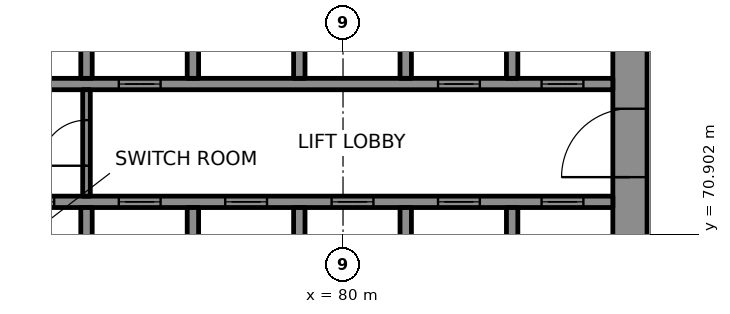
"""IFC4 building model, lengths in metres.
Left out: names, types, materials, properties, quantities, classifications, styles, units other than length and angle.
Written with IfcOpenShell. Run it as: python <this file> out.ifc"""

import sys

from ifc_helpers import new_model, si_unit, direction, frame, frame_2d, origin, place, context, subcontext, project, spatial, rectangle, extrude, element, fill, save


model = new_model("IFC4")
c1 = context("Model", 3, precision=1e-05, world=origin(), true_north=direction((0.0, 1.0)))
c2 = subcontext(c1, "Body", "Model", "MODEL_VIEW")
j1 = project(units=[si_unit("LENGTHUNIT", "METRE"), si_unit("PLANEANGLEUNIT", "RADIAN")], contexts=[c1])
p1 = place(None, origin())
s1 = spatial("IfcSite", under=j1, at=p1, CompositionType="ELEMENT")
p2 = place(p1, origin())
s2 = spatial("IfcBuilding", under=s1, at=p2, CompositionType="ELEMENT")
p3 = place(p2, frame((0.0, 0.0, 35.5)))
s3 = spatial("IfcBuildingStorey", under=s2, at=p3, CompositionType="ELEMENT", Elevation=35.5)
p4 = place(p3, frame((87.55, 66.9, 0.0), z_axis=(0.0, 0.0, 1.0), x_axis=(0.0, 1.0, 0.0)))
e1 = element("IfcWall", 1, at=p4, inside=s3, PredefinedType="SHEAR", context=c2, shape_type="SweptSolid", body=[
    extrude(rectangle(XDim=16.2, YDim=0.9, at=frame_2d((8.1, 0.0))), origin(), (0.0, 0.0, 1.0), 4.3),
])
p5 = place(p4, frame((5.5, 0.0, 0.0)))
e2 = element("IfcOpeningElement", 2, at=p5, cuts=e1, PredefinedType="OPENING", context=c2, shape_type="SweptSolid", body=[
    extrude(rectangle(XDim=1.8, YDim=2.1, at=frame_2d((0.9, 1.05))), frame((0.0, 0.46, 0.0), z_axis=(0.0, -1.0, 0.0), x_axis=(1.0, 0.0, 0.0)), (0.0, 0.0, 1.0), 0.92),
])
p6 = place(p4, frame((11.202, 0.0, 0.0)))
e3 = element("IfcOpeningElement", 3, at=p6, cuts=e1, PredefinedType="OPENING", context=c2, shape_type="SweptSolid", body=[
    extrude(rectangle(XDim=0.9, YDim=2.1, at=frame_2d((0.45, 1.05))), frame((0.0, 0.46, 0.0), z_axis=(0.0, -1.0, 0.0), x_axis=(1.0, 0.0, 0.0)), (0.0, 0.0, 1.0), 0.92),
])
p7 = place(p3, frame((70.3, 71.75, 0.0), z_axis=(0.0, 0.0, 1.0), x_axis=(1.0, 0.0, 0.0)))
e4 = element("IfcWall", 4, at=p7, inside=s3, PredefinedType="SHEAR", context=c2, shape_type="SweptSolid", body=[
    extrude(rectangle(XDim=16.8, YDim=0.3, at=frame_2d((8.4, 0.0))), origin(), (0.0, 0.0, 1.0), 4.3),
])
p8 = place(p7, frame((1.0, 0.0, 0.0)))
e5 = element("IfcOpeningElement", 5, at=p8, cuts=e4, PredefinedType="OPENING", context=c2, shape_type="SweptSolid", body=[
    extrude(rectangle(XDim=1.1, YDim=2.1, at=frame_2d((0.55, 1.05))), frame((0.0, 0.16, 0.0), z_axis=(0.0, -1.0, 0.0), x_axis=(1.0, 0.0, 0.0)), (0.0, 0.0, 1.0), 0.32),
])
p9 = place(p7, frame((3.8, 0.0, 0.0)))
e6 = element("IfcOpeningElement", 6, at=p9, cuts=e4, PredefinedType="OPENING", context=c2, shape_type="SweptSolid", body=[
    extrude(rectangle(XDim=1.1, YDim=2.1, at=frame_2d((0.55, 1.05))), frame((0.0, 0.16, 0.0), z_axis=(0.0, -1.0, 0.0), x_axis=(1.0, 0.0, 0.0)), (0.0, 0.0, 1.0), 0.32),
])
p10 = place(p7, frame((6.6, 0.0, 0.0)))
e7 = element("IfcOpeningElement", 7, at=p10, cuts=e4, PredefinedType="OPENING", context=c2, shape_type="SweptSolid", body=[
    extrude(rectangle(XDim=1.1, YDim=2.1, at=frame_2d((0.55, 1.05))), frame((0.0, 0.16, 0.0), z_axis=(0.0, -1.0, 0.0), x_axis=(1.0, 0.0, 0.0)), (0.0, 0.0, 1.0), 0.32),
])
p11 = place(p7, frame((9.4, 0.0, 0.0)))
e8 = element("IfcOpeningElement", 8, at=p11, cuts=e4, PredefinedType="OPENING", context=c2, shape_type="SweptSolid", body=[
    extrude(rectangle(XDim=1.1, YDim=2.1, at=frame_2d((0.55, 1.05))), frame((0.0, 0.16, 0.0), z_axis=(0.0, -1.0, 0.0), x_axis=(1.0, 0.0, 0.0)), (0.0, 0.0, 1.0), 0.32),
])
p12 = place(p7, frame((12.2, 0.0, 0.0)))
e9 = element("IfcOpeningElement", 9, at=p12, cuts=e4, PredefinedType="OPENING", context=c2, shape_type="SweptSolid", body=[
    extrude(rectangle(XDim=1.1, YDim=2.1, at=frame_2d((0.55, 1.05))), frame((0.0, 0.16, 0.0), z_axis=(0.0, -1.0, 0.0), x_axis=(1.0, 0.0, 0.0)), (0.0, 0.0, 1.0), 0.32),
])
p13 = place(p7, frame((14.925, 0.0, 0.0)))
e10 = element("IfcOpeningElement", 10, at=p13, cuts=e4, PredefinedType="OPENING", context=c2, shape_type="SweptSolid", body=[
    extrude(rectangle(XDim=1.1, YDim=2.1, at=frame_2d((0.55, 1.05))), frame((0.0, 0.16, 0.0), z_axis=(0.0, -1.0, 0.0), x_axis=(1.0, 0.0, 0.0)), (0.0, 0.0, 1.0), 0.32),
])
p14 = place(p3, frame((70.3, 74.85, 0.0), z_axis=(0.0, 0.0, 1.0), x_axis=(1.0, 0.0, 0.0)))
e11 = element("IfcWall", 11, at=p14, inside=s3, PredefinedType="SHEAR", context=c2, shape_type="SweptSolid", body=[
    extrude(rectangle(XDim=16.8, YDim=0.3, at=frame_2d((8.4, 0.0))), origin(), (0.0, 0.0, 1.0), 4.3),
])
p15 = place(p14, frame((3.8, 0.0, 0.0)))
e12 = element("IfcOpeningElement", 12, at=p15, cuts=e11, PredefinedType="OPENING", context=c2, shape_type="SweptSolid", body=[
    extrude(rectangle(XDim=1.1, YDim=2.1, at=frame_2d((0.55, 1.05))), frame((0.0, 0.16, 0.0), z_axis=(0.0, -1.0, 0.0), x_axis=(1.0, 0.0, 0.0)), (0.0, 0.0, 1.0), 0.32),
])
p16 = place(p14, frame((12.2, 0.0, 0.0)))
e13 = element("IfcOpeningElement", 13, at=p16, cuts=e11, PredefinedType="OPENING", context=c2, shape_type="SweptSolid", body=[
    extrude(rectangle(XDim=1.1, YDim=2.1, at=frame_2d((0.55, 1.05))), frame((0.0, 0.16, 0.0), z_axis=(0.0, -1.0, 0.0), x_axis=(1.0, 0.0, 0.0)), (0.0, 0.0, 1.0), 0.32),
])
p17 = place(p14, frame((14.925, 0.0, 0.0)))
e14 = element("IfcOpeningElement", 14, at=p17, cuts=e11, PredefinedType="OPENING", context=c2, shape_type="SweptSolid", body=[
    extrude(rectangle(XDim=1.1, YDim=2.1, at=frame_2d((0.55, 1.05))), frame((0.0, 0.16, 0.0), z_axis=(0.0, -1.0, 0.0), x_axis=(1.0, 0.0, 0.0)), (0.0, 0.0, 1.0), 0.32),
])
for number, where, z_axis, x_axis in (
    (15, (73.25, 69.0, 0.0), (0.0, 0.0, 1.0), (0.0, 1.0, 0.0)),
    (16, (73.25, 75.0, 0.0), (0.0, 0.0, 1.0), (0.0, 1.0, 0.0)),
    (17, (76.05, 69.0, 0.0), (0.0, 0.0, 1.0), (0.0, 1.0, 0.0)),
    (18, (76.05, 75.0, 0.0), (0.0, 0.0, 1.0), (0.0, 1.0, 0.0)),
    (19, (78.85, 69.0, 0.0), (0.0, 0.0, 1.0), (0.0, 1.0, 0.0)),
    (20, (78.85, 75.0, 0.0), (0.0, 0.0, 1.0), (0.0, 1.0, 0.0)),
    (21, (81.65, 69.0, 0.0), (0.0, 0.0, 1.0), (0.0, 1.0, 0.0)),
    (22, (81.65, 75.0, 0.0), (0.0, 0.0, 1.0), (0.0, 1.0, 0.0)),
    (23, (84.45, 69.0, 0.0), (0.0, 0.0, 1.0), (0.0, 1.0, 0.0)),
    (24, (84.45, 75.0, 0.0), (0.0, 0.0, 1.0), (0.0, 1.0, 0.0)),
):
    element("IfcWall", number, at=place(p3, frame(where, z_axis=z_axis, x_axis=x_axis)), inside=s3, PredefinedType="SHEAR", context=c2, shape_type="SweptSolid", body=[
        extrude(rectangle(XDim=2.6, YDim=0.3, at=frame_2d((1.3, 0.0))), origin(), (0.0, 0.0, 1.0), 4.3),
    ])
p18 = place(p3, frame((107.504, 60.451, 0.0), z_axis=(0.0, 0.0, 1.0), x_axis=(-0.500000550228, 0.86602508611, 0.0)))
e25 = element("IfcWall", 25, at=p18, inside=s3, PredefinedType="SOLIDWALL", context=c2, shape_type="SweptSolid", body=[
    extrude(rectangle(XDim=57.704, YDim=0.3, at=frame_2d((28.852, 0.0))), origin(), (0.0, 0.0, 1.0), 4.3),
])
p19 = place(p18, frame((0.89, 0.0, 0.8)))
e26 = element("IfcOpeningElement", 26, at=p19, cuts=e25, PredefinedType="OPENING", context=c2, shape_type="SweptSolid", body=[
    extrude(rectangle(XDim=3.0, YDim=2.4, at=frame_2d((1.5, 1.2))), frame((0.0, 0.16, 0.0), z_axis=(0.0, -1.0, 0.0), x_axis=(1.0, 0.0, 0.0)), (0.0, 0.0, 1.0), 0.32),
])
p20 = place(p18, frame((4.67, 0.0, 0.8)))
e27 = element("IfcOpeningElement", 27, at=p20, cuts=e25, PredefinedType="OPENING", context=c2, shape_type="SweptSolid", body=[
    extrude(rectangle(XDim=3.0, YDim=2.4, at=frame_2d((1.5, 1.2))), frame((0.0, 0.16, 0.0), z_axis=(0.0, -1.0, 0.0), x_axis=(1.0, 0.0, 0.0)), (0.0, 0.0, 1.0), 0.32),
])
p21 = place(p18, frame((8.451, 0.0, 0.8)))
e28 = element("IfcOpeningElement", 28, at=p21, cuts=e25, PredefinedType="OPENING", context=c2, shape_type="SweptSolid", body=[
    extrude(rectangle(XDim=3.0, YDim=2.4, at=frame_2d((1.5, 1.2))), frame((0.0, 0.16, 0.0), z_axis=(0.0, -1.0, 0.0), x_axis=(1.0, 0.0, 0.0)), (0.0, 0.0, 1.0), 0.32),
])
p22 = place(p18, frame((12.231, 0.0, 0.8)))
e29 = element("IfcOpeningElement", 29, at=p22, cuts=e25, PredefinedType="OPENING", context=c2, shape_type="SweptSolid", body=[
    extrude(rectangle(XDim=3.0, YDim=2.4, at=frame_2d((1.5, 1.2))), frame((0.0, 0.16, 0.0), z_axis=(0.0, -1.0, 0.0), x_axis=(1.0, 0.0, 0.0)), (0.0, 0.0, 1.0), 0.32),
])
p23 = place(p18, frame((16.011, 0.0, 0.8)))
e30 = element("IfcOpeningElement", 30, at=p23, cuts=e25, PredefinedType="OPENING", context=c2, shape_type="SweptSolid", body=[
    extrude(rectangle(XDim=3.0, YDim=2.4, at=frame_2d((1.5, 1.2))), frame((0.0, 0.16, 0.0), z_axis=(0.0, -1.0, 0.0), x_axis=(1.0, 0.0, 0.0)), (0.0, 0.0, 1.0), 0.32),
])
p24 = place(p18, frame((19.792, 0.0, 0.8)))
e31 = element("IfcOpeningElement", 31, at=p24, cuts=e25, PredefinedType="OPENING", context=c2, shape_type="SweptSolid", body=[
    extrude(rectangle(XDim=3.0, YDim=2.4, at=frame_2d((1.5, 1.2))), frame((0.0, 0.16, 0.0), z_axis=(0.0, -1.0, 0.0), x_axis=(1.0, 0.0, 0.0)), (0.0, 0.0, 1.0), 0.32),
])
p25 = place(p18, frame((23.572, 0.0, 0.8)))
e32 = element("IfcOpeningElement", 32, at=p25, cuts=e25, PredefinedType="OPENING", context=c2, shape_type="SweptSolid", body=[
    extrude(rectangle(XDim=3.0, YDim=2.4, at=frame_2d((1.5, 1.2))), frame((0.0, 0.16, 0.0), z_axis=(0.0, -1.0, 0.0), x_axis=(1.0, 0.0, 0.0)), (0.0, 0.0, 1.0), 0.32),
])
p26 = place(p18, frame((27.352, 0.0, 0.8)))
e33 = element("IfcOpeningElement", 33, at=p26, cuts=e25, PredefinedType="OPENING", context=c2, shape_type="SweptSolid", body=[
    extrude(rectangle(XDim=3.0, YDim=2.4, at=frame_2d((1.5, 1.2))), frame((0.0, 0.16, 0.0), z_axis=(0.0, -1.0, 0.0), x_axis=(1.0, 0.0, 0.0)), (0.0, 0.0, 1.0), 0.32),
])
p27 = place(p18, frame((31.132, 0.0, 0.8)))
e34 = element("IfcOpeningElement", 34, at=p27, cuts=e25, PredefinedType="OPENING", context=c2, shape_type="SweptSolid", body=[
    extrude(rectangle(XDim=3.0, YDim=2.4, at=frame_2d((1.5, 1.2))), frame((0.0, 0.16, 0.0), z_axis=(0.0, -1.0, 0.0), x_axis=(1.0, 0.0, 0.0)), (0.0, 0.0, 1.0), 0.32),
])
p28 = place(p18, frame((34.913, 0.0, 0.8)))
e35 = element("IfcOpeningElement", 35, at=p28, cuts=e25, PredefinedType="OPENING", context=c2, shape_type="SweptSolid", body=[
    extrude(rectangle(XDim=3.0, YDim=2.4, at=frame_2d((1.5, 1.2))), frame((0.0, 0.16, 0.0), z_axis=(0.0, -1.0, 0.0), x_axis=(1.0, 0.0, 0.0)), (0.0, 0.0, 1.0), 0.32),
])
p29 = place(p18, frame((38.693, 0.0, 0.8)))
e36 = element("IfcOpeningElement", 36, at=p29, cuts=e25, PredefinedType="OPENING", context=c2, shape_type="SweptSolid", body=[
    extrude(rectangle(XDim=3.0, YDim=2.4, at=frame_2d((1.5, 1.2))), frame((0.0, 0.16, 0.0), z_axis=(0.0, -1.0, 0.0), x_axis=(1.0, 0.0, 0.0)), (0.0, 0.0, 1.0), 0.32),
])
p30 = place(p18, frame((42.473, 0.0, 0.8)))
e37 = element("IfcOpeningElement", 37, at=p30, cuts=e25, PredefinedType="OPENING", context=c2, shape_type="SweptSolid", body=[
    extrude(rectangle(XDim=3.0, YDim=2.4, at=frame_2d((1.5, 1.2))), frame((0.0, 0.16, 0.0), z_axis=(0.0, -1.0, 0.0), x_axis=(1.0, 0.0, 0.0)), (0.0, 0.0, 1.0), 0.32),
])
p31 = place(p18, frame((46.253, 0.0, 0.8)))
e38 = element("IfcOpeningElement", 38, at=p31, cuts=e25, PredefinedType="OPENING", context=c2, shape_type="SweptSolid", body=[
    extrude(rectangle(XDim=3.0, YDim=2.4, at=frame_2d((1.5, 1.2))), frame((0.0, 0.16, 0.0), z_axis=(0.0, -1.0, 0.0), x_axis=(1.0, 0.0, 0.0)), (0.0, 0.0, 1.0), 0.32),
])
p32 = place(p18, frame((50.033, 0.0, 0.8)))
e39 = element("IfcOpeningElement", 39, at=p32, cuts=e25, PredefinedType="OPENING", context=c2, shape_type="SweptSolid", body=[
    extrude(rectangle(XDim=3.0, YDim=2.4, at=frame_2d((1.5, 1.2))), frame((0.0, 0.16, 0.0), z_axis=(0.0, -1.0, 0.0), x_axis=(1.0, 0.0, 0.0)), (0.0, 0.0, 1.0), 0.32),
])
p33 = place(p18, frame((53.814, 0.0, 0.8)))
e40 = element("IfcOpeningElement", 40, at=p33, cuts=e25, PredefinedType="OPENING", context=c2, shape_type="SweptSolid", body=[
    extrude(rectangle(XDim=3.0, YDim=2.4, at=frame_2d((1.5, 1.2))), frame((0.0, 0.16, 0.0), z_axis=(0.0, -1.0, 0.0), x_axis=(1.0, 0.0, 0.0)), (0.0, 0.0, 1.0), 0.32),
])
p34 = place(p3, frame((73.25, 71.9, 0.0), z_axis=(0.0, 0.0, 1.0), x_axis=(0.0, 1.0, 0.0)))
e41 = element("IfcWall", 41, at=p34, inside=s3, PredefinedType="PARTITIONING", context=c2, shape_type="SweptSolid", body=[
    extrude(rectangle(XDim=2.8, YDim=0.2, at=frame_2d((1.4, 0.0))), origin(), (0.0, 0.0, 1.0), 4.3),
])
p35 = place(p34, frame((0.8, 0.0, 0.0)))
e42 = element("IfcOpeningElement", 42, at=p35, cuts=e41, PredefinedType="OPENING", context=c2, shape_type="SweptSolid", body=[
    extrude(rectangle(XDim=1.2, YDim=2.1, at=frame_2d((0.6, 1.05))), frame((0.0, 0.11, 0.0), z_axis=(0.0, -1.0, 0.0), x_axis=(1.0, 0.0, 0.0)), (0.0, 0.0, 1.0), 0.22),
])
p36 = place(p8, origin())
e43 = element("IfcDoor", 43, at=p36, inside=s3, OperationType="DOUBLE_DOOR_SLIDING", PredefinedType="DOOR", context=c2, shape_type="SweptSolid", body=[
    extrude(rectangle(XDim=1.1, YDim=2.1, at=frame_2d((0.55, 1.05))), frame((0.0, 0.025, 0.0), z_axis=(0.0, -1.0, 0.0), x_axis=(1.0, 0.0, 0.0)), (0.0, 0.0, 1.0), 0.05),
])
fill(e5, e43)
p37 = place(p9, origin())
e44 = element("IfcDoor", 44, at=p37, inside=s3, OperationType="DOUBLE_DOOR_SLIDING", PredefinedType="DOOR", context=c2, shape_type="SweptSolid", body=[
    extrude(rectangle(XDim=1.1, YDim=2.1, at=frame_2d((0.55, 1.05))), frame((0.0, 0.025, 0.0), z_axis=(0.0, -1.0, 0.0), x_axis=(1.0, 0.0, 0.0)), (0.0, 0.0, 1.0), 0.05),
])
fill(e6, e44)
p38 = place(p10, origin())
e45 = element("IfcDoor", 45, at=p38, inside=s3, OperationType="DOUBLE_DOOR_SLIDING", PredefinedType="DOOR", context=c2, shape_type="SweptSolid", body=[
    extrude(rectangle(XDim=1.1, YDim=2.1, at=frame_2d((0.55, 1.05))), frame((0.0, 0.025, 0.0), z_axis=(0.0, -1.0, 0.0), x_axis=(1.0, 0.0, 0.0)), (0.0, 0.0, 1.0), 0.05),
])
fill(e7, e45)
p39 = place(p11, origin())
e46 = element("IfcDoor", 46, at=p39, inside=s3, OperationType="DOUBLE_DOOR_SLIDING", PredefinedType="DOOR", context=c2, shape_type="SweptSolid", body=[
    extrude(rectangle(XDim=1.1, YDim=2.1, at=frame_2d((0.55, 1.05))), frame((0.0, 0.025, 0.0), z_axis=(0.0, -1.0, 0.0), x_axis=(1.0, 0.0, 0.0)), (0.0, 0.0, 1.0), 0.05),
])
fill(e8, e46)
p40 = place(p12, origin())
e47 = element("IfcDoor", 47, at=p40, inside=s3, OperationType="DOUBLE_DOOR_SLIDING", PredefinedType="DOOR", context=c2, shape_type="SweptSolid", body=[
    extrude(rectangle(XDim=1.1, YDim=2.1, at=frame_2d((0.55, 1.05))), frame((0.0, 0.025, 0.0), z_axis=(0.0, -1.0, 0.0), x_axis=(1.0, 0.0, 0.0)), (0.0, 0.0, 1.0), 0.05),
])
fill(e9, e47)
p41 = place(p13, origin())
e48 = element("IfcDoor", 48, at=p41, inside=s3, OperationType="DOUBLE_DOOR_SLIDING", PredefinedType="DOOR", context=c2, shape_type="SweptSolid", body=[
    extrude(rectangle(XDim=1.1, YDim=2.1, at=frame_2d((0.55, 1.05))), frame((0.0, 0.025, 0.0), z_axis=(0.0, -1.0, 0.0), x_axis=(1.0, 0.0, 0.0)), (0.0, 0.0, 1.0), 0.05),
])
fill(e10, e48)
p42 = place(p15, origin())
e49 = element("IfcDoor", 49, at=p42, inside=s3, OperationType="DOUBLE_DOOR_SLIDING", PredefinedType="DOOR", context=c2, shape_type="SweptSolid", body=[
    extrude(rectangle(XDim=1.1, YDim=2.1, at=frame_2d((0.55, 1.05))), frame((0.0, 0.025, 0.0), z_axis=(0.0, -1.0, 0.0), x_axis=(1.0, 0.0, 0.0)), (0.0, 0.0, 1.0), 0.05),
])
fill(e12, e49)
p43 = place(p16, origin())
e50 = element("IfcDoor", 50, at=p43, inside=s3, OperationType="DOUBLE_DOOR_SLIDING", PredefinedType="DOOR", context=c2, shape_type="SweptSolid", body=[
    extrude(rectangle(XDim=1.1, YDim=2.1, at=frame_2d((0.55, 1.05))), frame((0.0, 0.025, 0.0), z_axis=(0.0, -1.0, 0.0), x_axis=(1.0, 0.0, 0.0)), (0.0, 0.0, 1.0), 0.05),
])
fill(e13, e50)
p44 = place(p17, origin())
e51 = element("IfcDoor", 51, at=p44, inside=s3, OperationType="DOUBLE_DOOR_SLIDING", PredefinedType="DOOR", context=c2, shape_type="SweptSolid", body=[
    extrude(rectangle(XDim=1.1, YDim=2.1, at=frame_2d((0.55, 1.05))), frame((0.0, 0.025, 0.0), z_axis=(0.0, -1.0, 0.0), x_axis=(1.0, 0.0, 0.0)), (0.0, 0.0, 1.0), 0.05),
])
fill(e14, e51)
p45 = place(p35, origin())
e52 = element("IfcDoor", 52, at=p45, inside=s3, OperationType="SINGLE_SWING_LEFT", PredefinedType="DOOR", context=c2, shape_type="SweptSolid", body=[
    extrude(rectangle(XDim=1.2, YDim=2.1, at=frame_2d((0.6, 1.05))), frame((0.0, 0.025, 0.0), z_axis=(0.0, -1.0, 0.0), x_axis=(1.0, 0.0, 0.0)), (0.0, 0.0, 1.0), 0.05),
])
fill(e42, e52)
p46 = place(p5, origin())
e53 = element("IfcDoor", 53, at=p46, inside=s3, OperationType="SINGLE_SWING_RIGHT", PredefinedType="DOOR", context=c2, shape_type="SweptSolid", body=[
    extrude(rectangle(XDim=1.8, YDim=2.1, at=frame_2d((0.9, 1.05))), frame((0.0, 0.17, 0.0), z_axis=(0.0, -1.0, 0.0), x_axis=(1.0, 0.0, 0.0)), (0.0, 0.0, 1.0), 0.34),
])
fill(e2, e53)
save(model, sys.argv[1])
